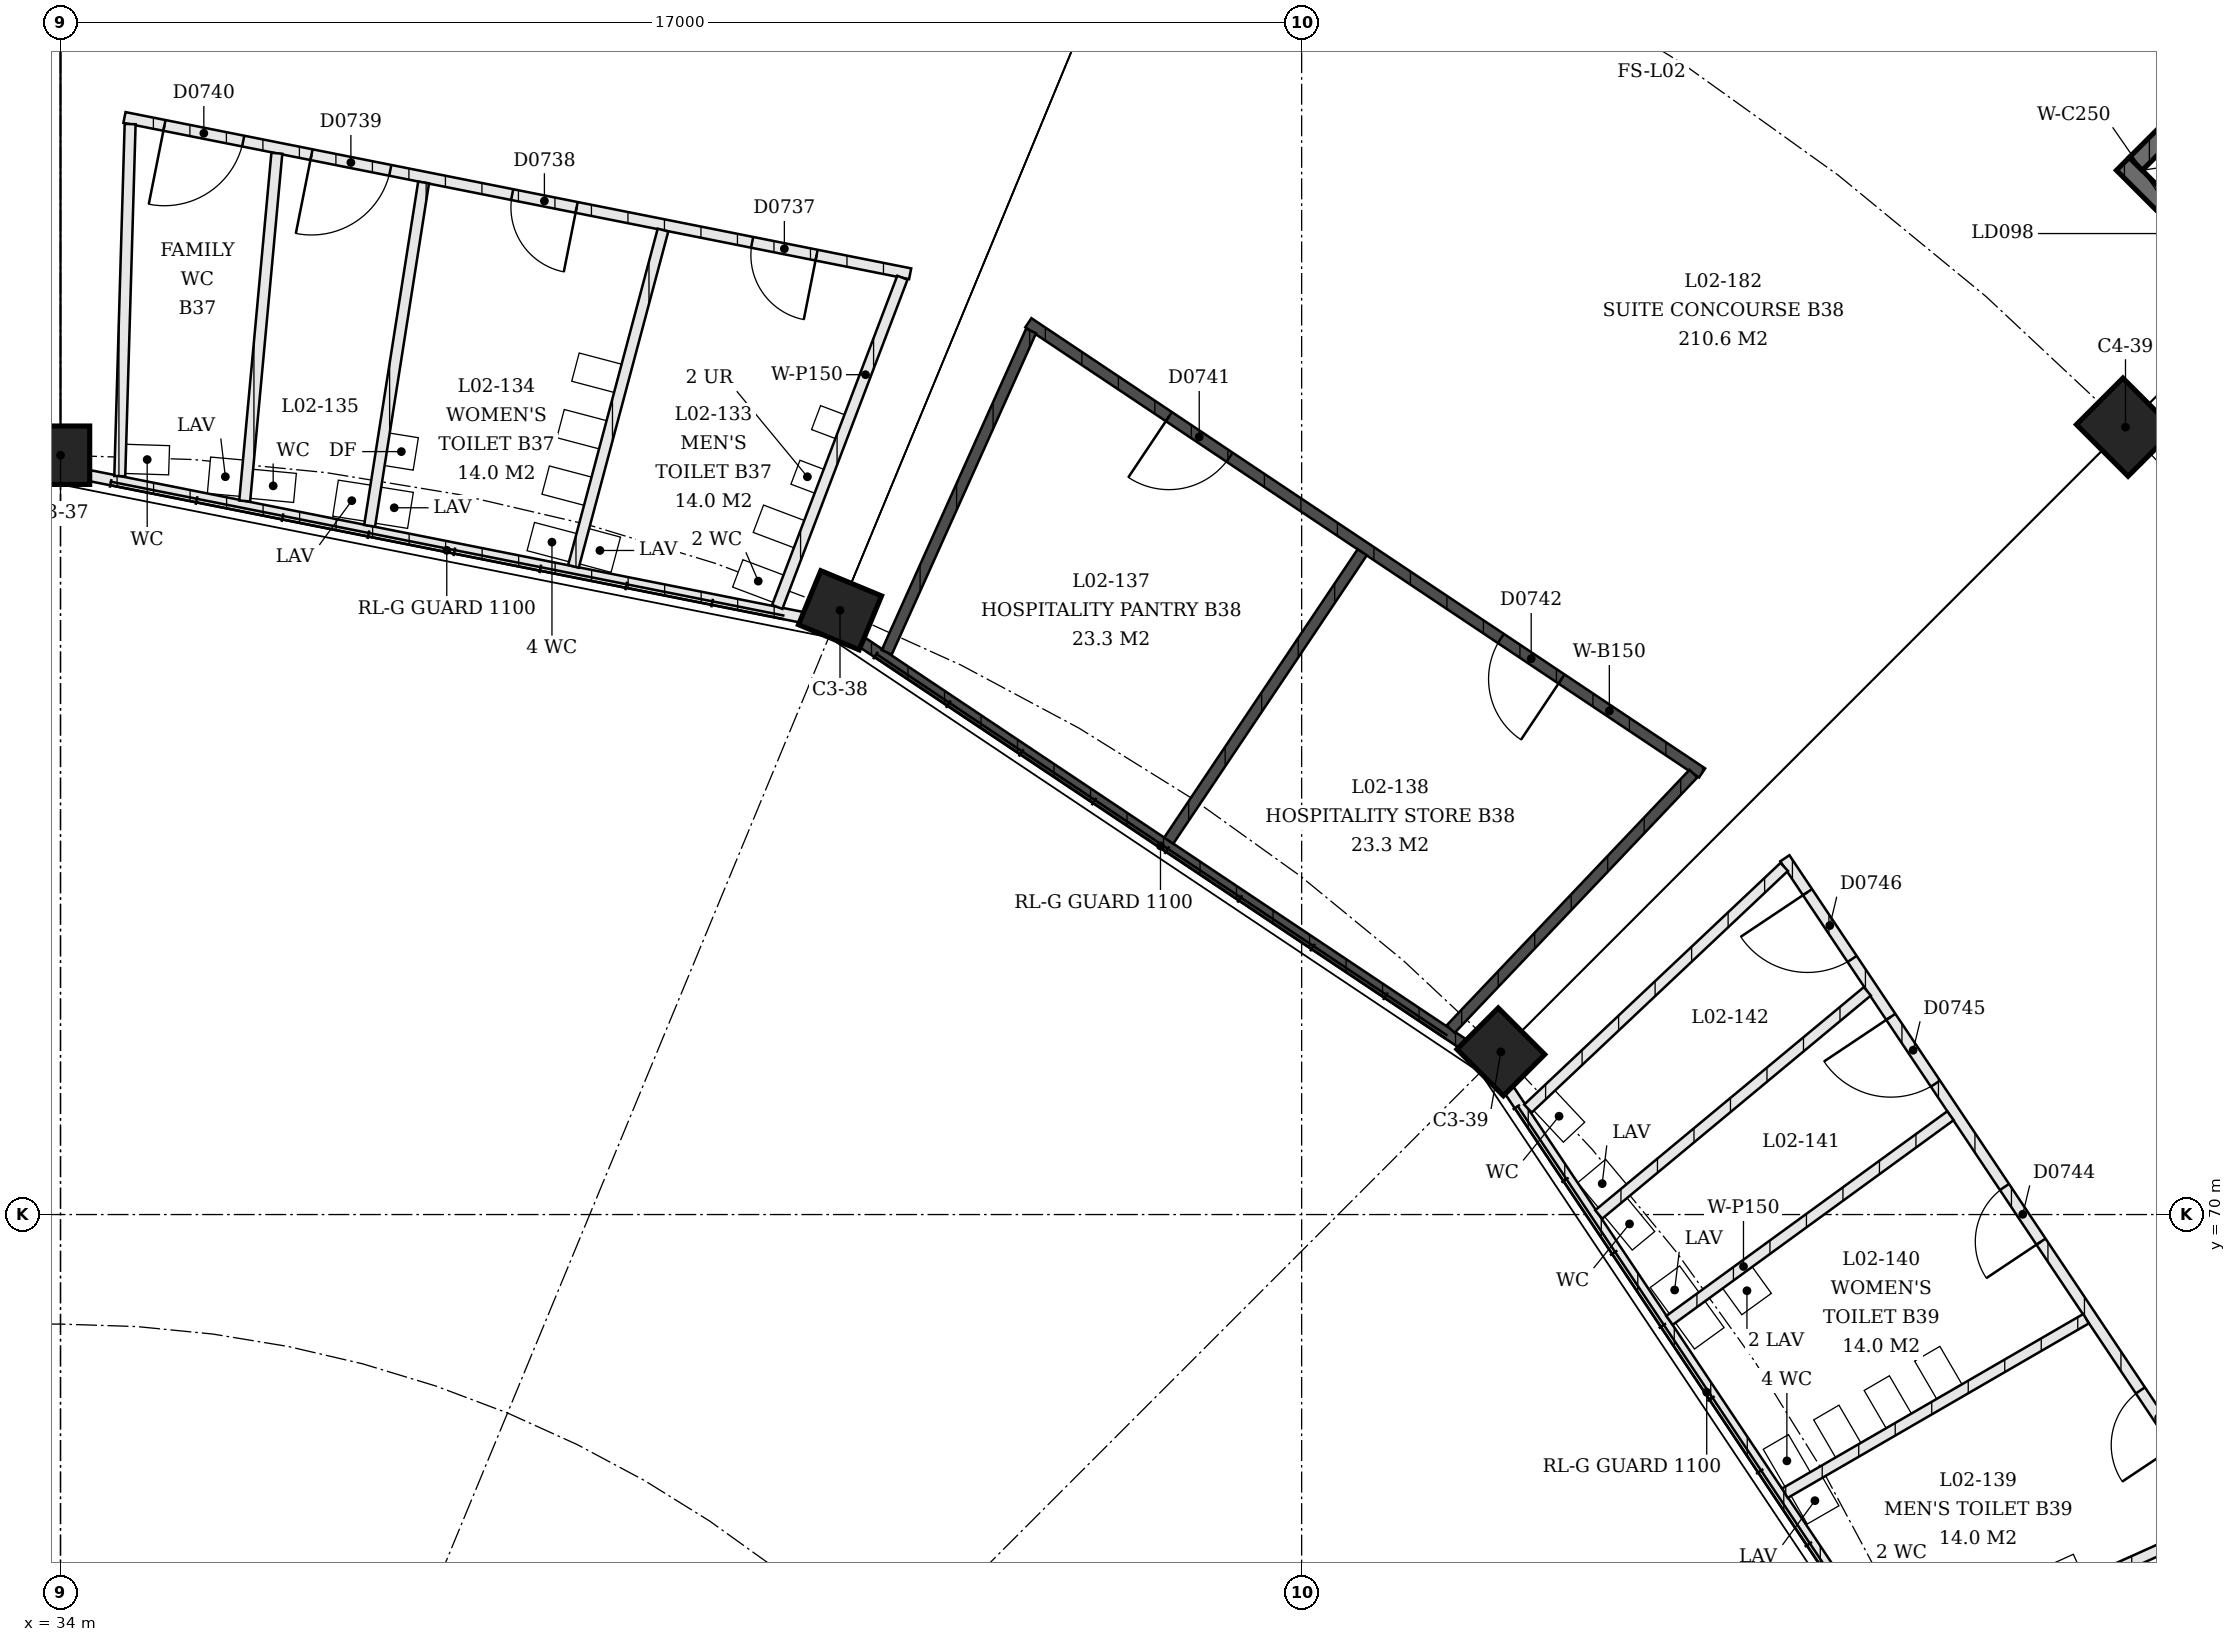
"""IFC4 building model, lengths in metres.
Left out: names, types, materials, properties, quantities, classifications, styles, units other than length and angle.
Written with IfcOpenShell. Run it as: python <this file> out.ifc"""

import sys

from ifc_helpers import new_model, si_unit, direction, frame, frame_2d, origin, origin_2d, place, context, subcontext, project, spatial, rectangle, extrude, element, fill, save


model = new_model("IFC4")
c1 = context("Model", 3, precision=1e-05, world=origin(), true_north=direction((0.0, 1.0)))
c2 = subcontext(c1, "Body", "Model", "MODEL_VIEW")
j1 = project(units=[si_unit("LENGTHUNIT", "METRE"), si_unit("PLANEANGLEUNIT", "RADIAN")], contexts=[c1])
p1 = place(None, origin())
s1 = spatial("IfcSite", under=j1, at=p1, CompositionType="ELEMENT")
p2 = place(p1, origin())
s2 = spatial("IfcBuilding", under=s1, at=p2, CompositionType="ELEMENT")
p3 = place(p2, frame((0.0, 0.0, 9.0)))
s3 = spatial("IfcBuildingStorey", under=s2, at=p3, CompositionType="ELEMENT", Elevation=9.0)
p4 = place(p3, frame((34.0, 80.4, 0.0), z_axis=(0.0, 0.0, 1.0), x_axis=(-1.0, 0.0, 0.0)))
e1 = element("IfcColumn", 1, at=p4, inside=s3, PredefinedType="COLUMN", context=c2, shape_type="SweptSolid", body=[
    extrude(rectangle(XDim=0.8, YDim=0.8, at=origin_2d()), origin(), (0.0, 0.0, 1.0), 4.5),
])
for number, where, z_axis, x_axis in (
    (2, (44.677, 78.276, 0.0), (0.0, 0.0, 1.0), (-0.924, 0.383, 0.0)),
    (3, (53.728, 72.228, 0.0), (0.0, 0.0, 1.0), (-0.707, 0.707, 0.0)),
):
    element("IfcColumn", number, at=place(p3, frame(where, z_axis=z_axis, x_axis=x_axis)), inside=s3, PredefinedType="COLUMN", context=c2, shape_type="SweptSolid", body=[
        extrude(rectangle(XDim=0.9, YDim=0.8, at=origin_2d()), origin(), (0.0, 0.0, 1.0), 4.5),
    ])
p5 = place(p3, frame((62.284, 80.784, 0.0), z_axis=(0.0, 0.0, 1.0), x_axis=(-0.707106781187, 0.707106781187, 0.0)))
e4 = element("IfcColumn", 4, at=p5, inside=s3, PredefinedType="COLUMN", context=c2, shape_type="SweptSolid", body=[
    extrude(rectangle(XDim=1.0, YDim=0.9, at=origin_2d()), origin(), (0.0, 0.0, 1.0), 4.5),
])
p6 = place(p3, frame((65.891, 80.749, 0.0), z_axis=(0.0, 0.0, 1.0), x_axis=(-0.707106781187, 0.707106781187, 0.0)))
e5 = element("IfcWall", 5, at=p6, inside=s3, PredefinedType="SHEAR", context=c2, shape_type="SweptSolid", body=[
    extrude(rectangle(XDim=5.15, YDim=0.25, at=frame_2d((2.575, 0.0))), origin(), (0.0, 0.0, 1.0), 4.09),
])
p7 = place(p6, frame((0.8, 0.0, 0.0)))
e6 = element("IfcOpeningElement", 6, at=p7, cuts=e5, PredefinedType="OPENING", context=c2, shape_type="SweptSolid", body=[
    extrude(rectangle(XDim=1.1, YDim=2.1, at=frame_2d((0.55, 1.05))), frame((0.0, 0.125, 0.0), z_axis=(0.0, -1.0, 0.0), x_axis=(1.0, 0.0, 0.0)), (0.0, 0.0, 1.0), 0.25),
])
p8 = place(p6, frame((3.25, 0.0, 0.0)))
e7 = element("IfcOpeningElement", 7, at=p8, cuts=e5, PredefinedType="OPENING", context=c2, shape_type="SweptSolid", body=[
    extrude(rectangle(XDim=1.1, YDim=2.1, at=frame_2d((0.55, 1.05))), frame((0.0, 0.125, 0.0), z_axis=(0.0, -1.0, 0.0), x_axis=(1.0, 0.0, 0.0)), (0.0, 0.0, 1.0), 0.25),
])
p9 = place(p3, frame((62.426, 84.391, 0.0), z_axis=(0.0, 0.0, 1.0), x_axis=(0.707147472125, 0.707066087907, 0.0)))
e8 = element("IfcWall", 8, at=p9, inside=s3, PredefinedType="SHEAR", context=c2, shape_type="SweptSolid", body=[
    extrude(rectangle(XDim=3.0, YDim=0.25, at=frame_2d((1.5, 0.0))), origin(), (0.0, 0.0, 1.0), 4.09),
])
p10 = place(p3, frame((44.15, 78.181, 0.0), z_axis=(0.0, 0.0, 1.0), x_axis=(-0.980786042223, 0.195086492048, 0.0)))
e9 = element("IfcWall", 9, at=p10, inside=s3, PredefinedType="PARTITIONING", context=c2, shape_type="SweptSolid", body=[
    extrude(rectangle(XDim=9.941, YDim=0.15, at=frame_2d((4.971, 0.0))), origin(), (0.0, 0.0, 1.0), 3.0),
])
p11 = place(p3, frame((45.638, 82.885, 0.0), z_axis=(0.0, 0.0, 1.0), x_axis=(-0.980788934186, 0.195071952313, 0.0)))
e10 = element("IfcWall", 10, at=p11, inside=s3, PredefinedType="PARTITIONING", context=c2, shape_type="SweptSolid", body=[
    extrude(rectangle(XDim=10.972, YDim=0.15, at=frame_2d((5.486, 0.0))), origin(), (0.0, 0.0, 1.0), 3.0),
])
p12 = place(p11, frame((1.307, 0.0, 0.0)))
e11 = element("IfcOpeningElement", 11, at=p12, cuts=e10, PredefinedType="OPENING", context=c2, shape_type="SweptSolid", body=[
    extrude(rectangle(XDim=0.9, YDim=2.1, at=frame_2d((0.45, 1.05))), frame((0.0, 0.075, 0.0), z_axis=(0.0, -1.0, 0.0), x_axis=(1.0, 0.0, 0.0)), (0.0, 0.0, 1.0), 0.15),
])
p13 = place(p11, frame((4.658, 0.0, 0.0)))
e12 = element("IfcOpeningElement", 12, at=p13, cuts=e10, PredefinedType="OPENING", context=c2, shape_type="SweptSolid", body=[
    extrude(rectangle(XDim=0.9, YDim=2.1, at=frame_2d((0.45, 1.05))), frame((0.0, 0.075, 0.0), z_axis=(0.0, -1.0, 0.0), x_axis=(1.0, 0.0, 0.0)), (0.0, 0.0, 1.0), 0.15),
])
p14 = place(p11, frame((7.26, 0.0, 0.0)))
e13 = element("IfcOpeningElement", 13, at=p14, cuts=e10, PredefinedType="OPENING", context=c2, shape_type="SweptSolid", body=[
    extrude(rectangle(XDim=1.1, YDim=2.1, at=frame_2d((0.55, 1.05))), frame((0.0, 0.075, 0.0), z_axis=(0.0, -1.0, 0.0), x_axis=(1.0, 0.0, 0.0)), (0.0, 0.0, 1.0), 0.15),
])
p15 = place(p11, frame((9.314, 0.0, 0.0)))
e14 = element("IfcOpeningElement", 14, at=p15, cuts=e10, PredefinedType="OPENING", context=c2, shape_type="SweptSolid", body=[
    extrude(rectangle(XDim=1.1, YDim=2.1, at=frame_2d((0.55, 1.05))), frame((0.0, 0.075, 0.0), z_axis=(0.0, -1.0, 0.0), x_axis=(1.0, 0.0, 0.0)), (0.0, 0.0, 1.0), 0.15),
])
p16 = place(p3, frame((43.817, 78.322, 0.0), z_axis=(0.0, 0.0, 1.0), x_axis=(0.35538492255, 0.934720041951, 0.0)))
e15 = element("IfcWall", 15, at=p16, inside=s3, PredefinedType="PARTITIONING", context=c2, shape_type="SweptSolid", body=[
    extrude(rectangle(XDim=4.824, YDim=0.15, at=frame_2d((2.412, 0.0))), origin(), (0.0, 0.0, 1.0), 3.0),
])
p17 = place(p3, frame((41.026, 78.877, 0.0), z_axis=(0.0, 0.0, 1.0), x_axis=(0.257378912157, 0.966310558556, 0.0)))
e16 = element("IfcWall", 16, at=p17, inside=s3, PredefinedType="PARTITIONING", context=c2, shape_type="SweptSolid", body=[
    extrude(rectangle(XDim=4.767, YDim=0.15, at=frame_2d((2.383, 0.0))), origin(), (0.0, 0.0, 1.0), 3.0),
])
p18 = place(p3, frame((38.234, 79.433, 0.0), z_axis=(0.0, 0.0, 1.0), x_axis=(0.155285736325, 0.987869596705, 0.0)))
e17 = element("IfcWall", 17, at=p18, inside=s3, PredefinedType="PARTITIONING", context=c2, shape_type="SweptSolid", body=[
    extrude(rectangle(XDim=4.761, YDim=0.15, at=frame_2d((2.38, 0.0))), origin(), (0.0, 0.0, 1.0), 3.0),
])
p19 = place(p3, frame((36.523, 79.773, 0.0), z_axis=(0.0, 0.0, 1.0), x_axis=(0.09208667632, 0.995750995, 0.0)))
e18 = element("IfcWall", 18, at=p19, inside=s3, PredefinedType="PARTITIONING", context=c2, shape_type="SweptSolid", body=[
    extrude(rectangle(XDim=4.783, YDim=0.15, at=frame_2d((2.391, 0.0))), origin(), (0.0, 0.0, 1.0), 3.0),
])
p20 = place(p3, frame((34.812, 80.114, 0.0), z_axis=(0.0, 0.0, 1.0), x_axis=(0.029405000692, 0.999567579473, 0.0)))
e19 = element("IfcWall", 19, at=p20, inside=s3, PredefinedType="PARTITIONING", context=c2, shape_type="SweptSolid", body=[
    extrude(rectangle(XDim=4.824, YDim=0.15, at=frame_2d((2.412, 0.0))), origin(), (0.0, 0.0, 1.0), 3.0),
])
p21 = place(p3, frame((44.982, 77.837, 0.0), z_axis=(0.0, 0.0, 1.0), x_axis=(0.831461186136, -0.555582843463, 0.0)))
e20 = element("IfcWall", 20, at=p21, inside=s3, PredefinedType="SOLIDWALL", context=c2, shape_type="SweptSolid", body=[
    extrude(rectangle(XDim=9.89, YDim=0.15, at=frame_2d((4.945, 0.0))), origin(), (0.0, 0.0, 1.0), 3.0),
])
p22 = place(p3, frame((47.257, 82.215, 0.0), z_axis=(0.0, 0.0, 1.0), x_axis=(0.831471162003, -0.555567913722, 0.0)))
e21 = element("IfcWall", 21, at=p22, inside=s3, PredefinedType="SOLIDWALL", context=c2, shape_type="SweptSolid", body=[
    extrude(rectangle(XDim=11.099, YDim=0.15, at=frame_2d((5.55, 0.0))), origin(), (0.0, 0.0, 1.0), 3.0),
])
p23 = place(p22, frame((2.315, 0.0, 0.0)))
e22 = element("IfcOpeningElement", 22, at=p23, cuts=e21, PredefinedType="OPENING", context=c2, shape_type="SweptSolid", body=[
    extrude(rectangle(XDim=1.0, YDim=2.1, at=frame_2d((0.5, 1.05))), frame((0.0, 0.075, 0.0), z_axis=(0.0, -1.0, 0.0), x_axis=(1.0, 0.0, 0.0)), (0.0, 0.0, 1.0), 0.15),
])
p24 = place(p22, frame((7.784, 0.0, 0.0)))
e23 = element("IfcOpeningElement", 23, at=p24, cuts=e21, PredefinedType="OPENING", context=c2, shape_type="SweptSolid", body=[
    extrude(rectangle(XDim=1.0, YDim=2.1, at=frame_2d((0.5, 1.05))), frame((0.0, 0.075, 0.0), z_axis=(0.0, -1.0, 0.0), x_axis=(1.0, 0.0, 0.0)), (0.0, 0.0, 1.0), 0.15),
])
p25 = place(p3, frame((45.317, 77.701, 0.0), z_axis=(0.0, 0.0, 1.0), x_axis=(0.409657452305, 0.912239426779, 0.0)))
e24 = element("IfcWall", 24, at=p25, inside=s3, PredefinedType="SOLIDWALL", context=c2, shape_type="SweptSolid", body=[
    extrude(rectangle(XDim=4.824, YDim=0.15, at=frame_2d((2.412, 0.0))), origin(), (0.0, 0.0, 1.0), 3.0),
])
p26 = place(p3, frame((49.179, 75.12, 0.0), z_axis=(0.0, 0.0, 1.0), x_axis=(0.557220399255, 0.830364634756, 0.0)))
e25 = element("IfcWall", 25, at=p26, inside=s3, PredefinedType="SOLIDWALL", context=c2, shape_type="SweptSolid", body=[
    extrude(rectangle(XDim=4.757, YDim=0.15, at=frame_2d((2.378, 0.0))), origin(), (0.0, 0.0, 1.0), 3.0),
])
p27 = place(p3, frame((53.041, 72.54, 0.0), z_axis=(0.0, 0.0, 1.0), x_axis=(0.688819908774, 0.724932502566, 0.0)))
e26 = element("IfcWall", 26, at=p27, inside=s3, PredefinedType="SOLIDWALL", context=c2, shape_type="SweptSolid", body=[
    extrude(rectangle(XDim=4.827, YDim=0.15, at=frame_2d((2.414, 0.0))), origin(), (0.0, 0.0, 1.0), 3.0),
])
p28 = place(p3, frame((59.337, 63.482, 0.0), z_axis=(0.0, 0.0, 1.0), x_axis=(-0.555582843463, 0.831461186136, 0.0)))
e27 = element("IfcWall", 27, at=p28, inside=s3, PredefinedType="PARTITIONING", context=c2, shape_type="SweptSolid", body=[
    extrude(rectangle(XDim=9.89, YDim=0.15, at=frame_2d((4.945, 0.0))), origin(), (0.0, 0.0, 1.0), 3.0),
])
p29 = place(p3, frame((63.715, 65.757, 0.0), z_axis=(0.0, 0.0, 1.0), x_axis=(-0.555577934543, 0.831464466258, 0.0)))
e28 = element("IfcWall", 28, at=p29, inside=s3, PredefinedType="PARTITIONING", context=c2, shape_type="SweptSolid", body=[
    extrude(rectangle(XDim=10.972, YDim=0.15, at=frame_2d((5.486, 0.0))), origin(), (0.0, 0.0, 1.0), 3.0),
])
p30 = place(p29, frame((1.307, 0.0, 0.0)))
e29 = element("IfcOpeningElement", 29, at=p30, cuts=e28, PredefinedType="OPENING", context=c2, shape_type="SweptSolid", body=[
    extrude(rectangle(XDim=0.9, YDim=2.1, at=frame_2d((0.45, 1.05))), frame((0.0, 0.075, 0.0), z_axis=(0.0, -1.0, 0.0), x_axis=(1.0, 0.0, 0.0)), (0.0, 0.0, 1.0), 0.15),
])
p31 = place(p29, frame((4.658, 0.0, 0.0)))
e30 = element("IfcOpeningElement", 30, at=p31, cuts=e28, PredefinedType="OPENING", context=c2, shape_type="SweptSolid", body=[
    extrude(rectangle(XDim=0.9, YDim=2.1, at=frame_2d((0.45, 1.05))), frame((0.0, 0.075, 0.0), z_axis=(0.0, -1.0, 0.0), x_axis=(1.0, 0.0, 0.0)), (0.0, 0.0, 1.0), 0.15),
])
p32 = place(p29, frame((7.26, 0.0, 0.0)))
e31 = element("IfcOpeningElement", 31, at=p32, cuts=e28, PredefinedType="OPENING", context=c2, shape_type="SweptSolid", body=[
    extrude(rectangle(XDim=1.1, YDim=2.1, at=frame_2d((0.55, 1.05))), frame((0.0, 0.075, 0.0), z_axis=(0.0, -1.0, 0.0), x_axis=(1.0, 0.0, 0.0)), (0.0, 0.0, 1.0), 0.15),
])
p33 = place(p29, frame((9.314, 0.0, 0.0)))
e32 = element("IfcOpeningElement", 32, at=p33, cuts=e28, PredefinedType="OPENING", context=c2, shape_type="SweptSolid", body=[
    extrude(rectangle(XDim=1.1, YDim=2.1, at=frame_2d((0.55, 1.05))), frame((0.0, 0.075, 0.0), z_axis=(0.0, -1.0, 0.0), x_axis=(1.0, 0.0, 0.0)), (0.0, 0.0, 1.0), 0.15),
])
p34 = place(p3, frame((59.201, 63.817, 0.0), z_axis=(0.0, 0.0, 1.0), x_axis=(0.912239426779, 0.409657452305, 0.0)))
e33 = element("IfcWall", 33, at=p34, inside=s3, PredefinedType="PARTITIONING", context=c2, shape_type="SweptSolid", body=[
    extrude(rectangle(XDim=4.824, YDim=0.15, at=frame_2d((2.412, 0.0))), origin(), (0.0, 0.0, 1.0), 3.0),
])
p35 = place(p3, frame((57.62, 66.184, 0.0), z_axis=(0.0, 0.0, 1.0), x_axis=(0.865252065429, 0.5013370755, 0.0)))
e34 = element("IfcWall", 34, at=p35, inside=s3, PredefinedType="PARTITIONING", context=c2, shape_type="SweptSolid", body=[
    extrude(rectangle(XDim=4.767, YDim=0.15, at=frame_2d((2.383, 0.0))), origin(), (0.0, 0.0, 1.0), 3.0),
])
p36 = place(p3, frame((56.038, 68.551, 0.0), z_axis=(0.0, 0.0, 1.0), x_axis=(0.808345614711, 0.58870821905, 0.0)))
e35 = element("IfcWall", 35, at=p36, inside=s3, PredefinedType="PARTITIONING", context=c2, shape_type="SweptSolid", body=[
    extrude(rectangle(XDim=4.761, YDim=0.15, at=frame_2d((2.38, 0.0))), origin(), (0.0, 0.0, 1.0), 3.0),
])
p37 = place(p3, frame((55.069, 70.001, 0.0), z_axis=(0.0, 0.0, 1.0), x_axis=(0.769237079492, 0.63896346964, 0.0)))
e36 = element("IfcWall", 36, at=p37, inside=s3, PredefinedType="PARTITIONING", context=c2, shape_type="SweptSolid", body=[
    extrude(rectangle(XDim=4.783, YDim=0.15, at=frame_2d((2.391, 0.0))), origin(), (0.0, 0.0, 1.0), 3.0),
])
p38 = place(p3, frame((54.1, 71.452, 0.0), z_axis=(0.0, 0.0, 1.0), x_axis=(0.727577136184, 0.686025882093, 0.0)))
e37 = element("IfcWall", 37, at=p38, inside=s3, PredefinedType="PARTITIONING", context=c2, shape_type="SweptSolid", body=[
    extrude(rectangle(XDim=4.824, YDim=0.15, at=frame_2d((2.412, 0.0))), origin(), (0.0, 0.0, 1.0), 3.0),
])
p39 = place(p12, origin())
e38 = element("IfcDoor", 38, at=p39, inside=s3, OperationType="SINGLE_SWING_RIGHT", PredefinedType="DOOR", context=c2, shape_type="SweptSolid", body=[
    extrude(rectangle(XDim=0.9, YDim=2.1, at=frame_2d((0.45, 1.05))), frame((0.0, 0.025, 0.0), z_axis=(0.0, -1.0, 0.0), x_axis=(1.0, 0.0, 0.0)), (0.0, 0.0, 1.0), 0.05),
])
fill(e11, e38)
p40 = place(p13, origin())
e39 = element("IfcDoor", 39, at=p40, inside=s3, OperationType="SINGLE_SWING_RIGHT", PredefinedType="DOOR", context=c2, shape_type="SweptSolid", body=[
    extrude(rectangle(XDim=0.9, YDim=2.1, at=frame_2d((0.45, 1.05))), frame((0.0, 0.025, 0.0), z_axis=(0.0, -1.0, 0.0), x_axis=(1.0, 0.0, 0.0)), (0.0, 0.0, 1.0), 0.05),
])
fill(e12, e39)
p41 = place(p14, origin())
e40 = element("IfcDoor", 40, at=p41, inside=s3, OperationType="SINGLE_SWING_LEFT", PredefinedType="DOOR", context=c2, shape_type="SweptSolid", body=[
    extrude(rectangle(XDim=1.1, YDim=2.1, at=frame_2d((0.55, 1.05))), frame((0.0, 0.025, 0.0), z_axis=(0.0, -1.0, 0.0), x_axis=(1.0, 0.0, 0.0)), (0.0, 0.0, 1.0), 0.05),
])
fill(e13, e40)
p42 = place(p15, origin())
e41 = element("IfcDoor", 41, at=p42, inside=s3, OperationType="SINGLE_SWING_LEFT", PredefinedType="DOOR", context=c2, shape_type="SweptSolid", body=[
    extrude(rectangle(XDim=1.1, YDim=2.1, at=frame_2d((0.55, 1.05))), frame((0.0, 0.025, 0.0), z_axis=(0.0, -1.0, 0.0), x_axis=(1.0, 0.0, 0.0)), (0.0, 0.0, 1.0), 0.05),
])
fill(e14, e41)
p43 = place(p23, origin())
e42 = element("IfcDoor", 42, at=p43, inside=s3, OperationType="SINGLE_SWING_LEFT", PredefinedType="DOOR", context=c2, shape_type="SweptSolid", body=[
    extrude(rectangle(XDim=1.0, YDim=2.1, at=frame_2d((0.5, 1.05))), frame((0.0, 0.025, 0.0), z_axis=(0.0, -1.0, 0.0), x_axis=(1.0, 0.0, 0.0)), (0.0, 0.0, 1.0), 0.05),
])
fill(e22, e42)
p44 = place(p24, origin())
e43 = element("IfcDoor", 43, at=p44, inside=s3, OperationType="SINGLE_SWING_RIGHT", PredefinedType="DOOR", context=c2, shape_type="SweptSolid", body=[
    extrude(rectangle(XDim=1.0, YDim=2.1, at=frame_2d((0.5, 1.05))), frame((0.0, 0.025, 0.0), z_axis=(0.0, -1.0, 0.0), x_axis=(1.0, 0.0, 0.0)), (0.0, 0.0, 1.0), 0.05),
])
fill(e23, e43)
p45 = place(p30, origin())
e44 = element("IfcDoor", 44, at=p45, inside=s3, OperationType="SINGLE_SWING_RIGHT", PredefinedType="DOOR", context=c2, shape_type="SweptSolid", body=[
    extrude(rectangle(XDim=0.9, YDim=2.1, at=frame_2d((0.45, 1.05))), frame((0.0, 0.025, 0.0), z_axis=(0.0, -1.0, 0.0), x_axis=(1.0, 0.0, 0.0)), (0.0, 0.0, 1.0), 0.05),
])
fill(e29, e44)
p46 = place(p31, origin())
e45 = element("IfcDoor", 45, at=p46, inside=s3, OperationType="SINGLE_SWING_RIGHT", PredefinedType="DOOR", context=c2, shape_type="SweptSolid", body=[
    extrude(rectangle(XDim=0.9, YDim=2.1, at=frame_2d((0.45, 1.05))), frame((0.0, 0.025, 0.0), z_axis=(0.0, -1.0, 0.0), x_axis=(1.0, 0.0, 0.0)), (0.0, 0.0, 1.0), 0.05),
])
fill(e30, e45)
p47 = place(p32, origin())
e46 = element("IfcDoor", 46, at=p47, inside=s3, OperationType="SINGLE_SWING_LEFT", PredefinedType="DOOR", context=c2, shape_type="SweptSolid", body=[
    extrude(rectangle(XDim=1.1, YDim=2.1, at=frame_2d((0.55, 1.05))), frame((0.0, 0.025, 0.0), z_axis=(0.0, -1.0, 0.0), x_axis=(1.0, 0.0, 0.0)), (0.0, 0.0, 1.0), 0.05),
])
fill(e31, e46)
p48 = place(p33, origin())
e47 = element("IfcDoor", 47, at=p48, inside=s3, OperationType="SINGLE_SWING_LEFT", PredefinedType="DOOR", context=c2, shape_type="SweptSolid", body=[
    extrude(rectangle(XDim=1.1, YDim=2.1, at=frame_2d((0.55, 1.05))), frame((0.0, 0.025, 0.0), z_axis=(0.0, -1.0, 0.0), x_axis=(1.0, 0.0, 0.0)), (0.0, 0.0, 1.0), 0.05),
])
fill(e32, e47)
save(model, sys.argv[1])
